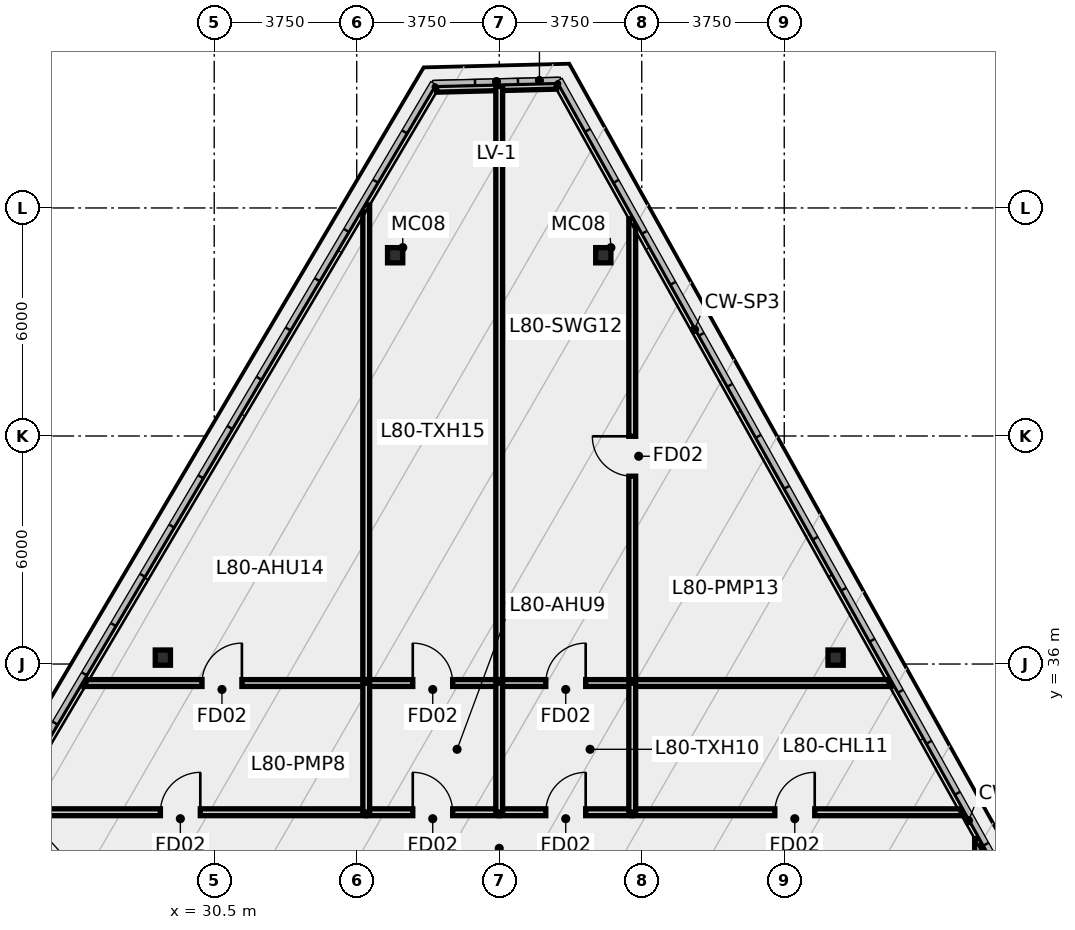
"""IFC4 building model, lengths in metres.
Left out: names, types, materials, properties, quantities, classifications, styles, units other than length and angle.
Written with IfcOpenShell. Run it as: python <this file> out.ifc"""

import sys

from ifc_helpers import new_model, si_unit, direction, frame, frame_2d, origin, origin_2d, place, context, subcontext, project, spatial, rectangle, hollow_rectangle, extrude, source, transform, mapped, element, fill, save


model = new_model("IFC4")
c1 = context("Model", 3, precision=1e-05, world=origin(), true_north=direction((0.0, 1.0)))
c2 = subcontext(c1, "Body", "Model", "MODEL_VIEW")
j1 = project(units=[si_unit("LENGTHUNIT", "METRE"), si_unit("PLANEANGLEUNIT", "RADIAN")], contexts=[c1])
p1 = place(None, origin())
s1 = spatial("IfcSite", under=j1, at=p1, CompositionType="ELEMENT")
p2 = place(p1, origin())
s2 = spatial("IfcBuilding", under=s1, at=p2, CompositionType="ELEMENT")
p3 = place(p2, frame((0.0, 0.0, 303.4)))
s3 = spatial("IfcBuildingStorey", under=s2, at=p3, CompositionType="ELEMENT", Elevation=303.4)
m1 = source(origin(), c2, "Body", "SweptSolid", [
    extrude(hollow_rectangle(XDim=0.4, YDim=0.4, WallThickness=0.016, at=origin_2d()), origin(), (0.0, 0.0, 1.0), 13.522),
])
p4 = place(p3, frame((40.739, 46.756, 0.0), z_axis=(0.0, 0.0, 1.0), x_axis=(1.0, 0.0, 0.0)))
e1 = element("IfcColumn", 1, at=p4, inside=s3, PredefinedType="COLUMN", context=c2, shape_type="MappedRepresentation", body=[
    mapped(m1, transform((0.0, 0.0, 0.0), scale=1.0)),
])
m2 = source(origin(), c2, "Body", "SweptSolid", [
    extrude(hollow_rectangle(XDim=0.4, YDim=0.4, WallThickness=0.016, at=origin_2d()), origin(), (0.0, 0.0, 1.0), 12.933),
])
p5 = place(p3, frame((35.261, 46.756, 0.0), z_axis=(0.0, 0.0, 1.0), x_axis=(1.0, 0.0, 0.0)))
e2 = element("IfcColumn", 2, at=p5, inside=s3, PredefinedType="COLUMN", context=c2, shape_type="MappedRepresentation", body=[
    mapped(m2, transform((0.0, 0.0, 0.0), scale=1.0)),
])
m3 = source(origin(), c2, "Body", "SweptSolid", [
    extrude(hollow_rectangle(XDim=0.4, YDim=0.4, WallThickness=0.016, at=origin_2d()), origin(), (0.0, 0.0, 1.0), 10.304),
])
p6 = place(p3, frame((29.148, 36.169, 0.0), z_axis=(0.0, 0.0, 1.0), x_axis=(1.0, 0.0, 0.0)))
e3 = element("IfcColumn", 3, at=p6, inside=s3, PredefinedType="COLUMN", context=c2, shape_type="MappedRepresentation", body=[
    mapped(m3, transform((0.0, 0.0, 0.0), scale=1.0)),
])
m4 = source(origin(), c2, "Body", "SweptSolid", [
    extrude(hollow_rectangle(XDim=0.4, YDim=0.4, WallThickness=0.016, at=origin_2d()), origin(), (0.0, 0.0, 1.0), 12.207),
])
p7 = place(p3, frame((46.852, 36.169, 0.0), z_axis=(0.0, 0.0, 1.0), x_axis=(1.0, 0.0, 0.0)))
e4 = element("IfcColumn", 4, at=p7, inside=s3, PredefinedType="COLUMN", context=c2, shape_type="MappedRepresentation", body=[
    mapped(m4, transform((0.0, 0.0, 0.0), scale=1.0)),
])
p8 = place(p3, frame((36.349, 51.177, 0.0), z_axis=(0.0, 0.0, 1.0), x_axis=(0.999684061487, 0.025135178708, 0.0)))
e5 = element("IfcWall", 5, at=p8, inside=s3, PredefinedType="STANDARD", context=c2, shape_type="SweptSolid", body=[
    extrude(rectangle(XDim=3.157, YDim=0.26, at=frame_2d((1.578, 0.0))), origin(), (0.0, 0.0, 1.0), 3.4),
])
p9 = place(p3, frame((38.0, 35.505, 0.0), z_axis=(0.0, 0.0, 1.0), x_axis=(0.0, 1.0, 0.0)))
e6 = element("IfcWall", 6, at=p9, inside=s3, PredefinedType="PARTITIONING", context=c2, shape_type="SweptSolid", body=[
    extrude(rectangle(XDim=15.693, YDim=0.18, at=frame_2d((7.847, 0.0))), origin(), (0.0, 0.0, 1.0), 3.15),
])
p10 = place(p3, frame((34.5, 35.505, 0.0), z_axis=(0.0, 0.0, 1.0), x_axis=(0.0, 1.0, 0.0)))
e7 = element("IfcWall", 7, at=p10, inside=s3, PredefinedType="PARTITIONING", context=c2, shape_type="SweptSolid", body=[
    extrude(rectangle(XDim=12.574, YDim=0.18, at=frame_2d((6.287, 0.0))), origin(), (0.0, 0.0, 1.0), 3.15),
])
p11 = place(p3, frame((41.5, 35.505, 0.0), z_axis=(0.0, 0.0, 1.0), x_axis=(0.0, 1.0, 0.0)))
e8 = element("IfcWall", 8, at=p11, inside=s3, PredefinedType="PARTITIONING", context=c2, shape_type="SweptSolid", body=[
    extrude(rectangle(XDim=12.21, YDim=0.18, at=frame_2d((6.105, 0.0))), origin(), (0.0, 0.0, 1.0), 3.15),
])
p12 = place(p11, frame((5.437, 0.0, 0.0)))
e9 = element("IfcOpeningElement", 9, at=p12, cuts=e8, PredefinedType="OPENING", context=c2, shape_type="SweptSolid", body=[
    extrude(rectangle(XDim=1.05, YDim=2.15, at=frame_2d((0.525, 1.075))), frame((0.0, 0.102, 0.0), z_axis=(0.0, -1.0, 0.0), x_axis=(1.0, 0.0, 0.0)), (0.0, 0.0, 1.0), 0.204),
])
p13 = place(p3, frame((25.062, 32.1, 0.0), z_axis=(0.0, 0.0, 1.0), x_axis=(1.0, 0.0, 0.0)))
e10 = element("IfcWall", 10, at=p13, inside=s3, PredefinedType="PARTITIONING", context=c2, shape_type="SweptSolid", body=[
    extrude(rectangle(XDim=9.433, YDim=0.18, at=frame_2d((4.717, 0.0))), origin(), (0.0, 0.0, 1.0), 3.15),
])
p14 = place(p13, frame((4.022, 0.0, 0.0)))
e11 = element("IfcOpeningElement", 11, at=p14, cuts=e10, PredefinedType="OPENING", context=c2, shape_type="SweptSolid", body=[
    extrude(rectangle(XDim=1.05, YDim=2.15, at=frame_2d((0.525, 1.075))), frame((0.0, 0.102, 0.0), z_axis=(0.0, -1.0, 0.0), x_axis=(1.0, 0.0, 0.0)), (0.0, 0.0, 1.0), 0.204),
])
p15 = place(p3, frame((41.505, 32.1, 0.0), z_axis=(0.0, 0.0, 1.0), x_axis=(1.0, 0.0, 0.0)))
e12 = element("IfcWall", 12, at=p15, inside=s3, PredefinedType="PARTITIONING", context=c2, shape_type="SweptSolid", body=[
    extrude(rectangle(XDim=8.699, YDim=0.18, at=frame_2d((4.35, 0.0))), origin(), (0.0, 0.0, 1.0), 3.15),
])
p16 = place(p15, frame((3.747, 0.0, 0.0)))
e13 = element("IfcOpeningElement", 13, at=p16, cuts=e12, PredefinedType="OPENING", context=c2, shape_type="SweptSolid", body=[
    extrude(rectangle(XDim=1.05, YDim=2.15, at=frame_2d((0.525, 1.075))), frame((0.0, 0.102, 0.0), z_axis=(0.0, -1.0, 0.0), x_axis=(1.0, 0.0, 0.0)), (0.0, 0.0, 1.0), 0.204),
])
p17 = place(p3, frame((27.072, 35.5, 0.0), z_axis=(0.0, 0.0, 1.0), x_axis=(1.0, 0.0, 0.0)))
e14 = element("IfcWall", 14, at=p17, inside=s3, PredefinedType="PARTITIONING", context=c2, shape_type="SweptSolid", body=[
    extrude(rectangle(XDim=7.423, YDim=0.18, at=frame_2d((3.712, 0.0))), origin(), (0.0, 0.0, 1.0), 3.15),
])
p18 = place(p17, frame((3.107, 0.0, 0.0)))
e15 = element("IfcOpeningElement", 15, at=p18, cuts=e14, PredefinedType="OPENING", context=c2, shape_type="SweptSolid", body=[
    extrude(rectangle(XDim=1.05, YDim=2.15, at=frame_2d((0.525, 1.075))), frame((0.0, 0.102, 0.0), z_axis=(0.0, -1.0, 0.0), x_axis=(1.0, 0.0, 0.0)), (0.0, 0.0, 1.0), 0.204),
])
p19 = place(p3, frame((41.505, 35.5, 0.0), z_axis=(0.0, 0.0, 1.0), x_axis=(1.0, 0.0, 0.0)))
e16 = element("IfcWall", 16, at=p19, inside=s3, PredefinedType="PARTITIONING", context=c2, shape_type="SweptSolid", body=[
    extrude(rectangle(XDim=6.802, YDim=0.18, at=frame_2d((3.401, 0.0))), origin(), (0.0, 0.0, 1.0), 3.15),
])
p20 = place(p3, frame((50.6, 25.005, 0.0), z_axis=(0.0, 0.0, 1.0), x_axis=(0.0, 1.0, 0.0)))
e17 = element("IfcWall", 17, at=p20, inside=s3, PredefinedType="PARTITIONING", context=c2, shape_type="SweptSolid", body=[
    extrude(rectangle(XDim=6.402, YDim=0.18, at=frame_2d((3.201, 0.0))), origin(), (0.0, 0.0, 1.0), 3.15),
])
p21 = place(p20, frame((2.88, 0.0, 0.0)))
e18 = element("IfcOpeningElement", 18, at=p21, cuts=e17, PredefinedType="OPENING", context=c2, shape_type="SweptSolid", body=[
    extrude(rectangle(XDim=1.05, YDim=2.15, at=frame_2d((0.525, 1.075))), frame((0.0, 0.102, 0.0), z_axis=(0.0, -1.0, 0.0), x_axis=(1.0, 0.0, 0.0)), (0.0, 0.0, 1.0), 0.204),
])
p22 = place(p3, frame((34.505, 32.1, 0.0), z_axis=(0.0, 0.0, 1.0), x_axis=(1.0, 0.0, 0.0)))
e19 = element("IfcWall", 19, at=p22, inside=s3, PredefinedType="PARTITIONING", context=c2, shape_type="SweptSolid", body=[
    extrude(rectangle(XDim=3.49, YDim=0.18, at=frame_2d((1.745, 0.0))), origin(), (0.0, 0.0, 1.0), 3.15),
])
p23 = place(p22, frame((1.22, 0.0, 0.0)))
e20 = element("IfcOpeningElement", 20, at=p23, cuts=e19, PredefinedType="OPENING", context=c2, shape_type="SweptSolid", body=[
    extrude(rectangle(XDim=1.05, YDim=2.15, at=frame_2d((0.525, 1.075))), frame((0.0, 0.102, 0.0), z_axis=(0.0, -1.0, 0.0), x_axis=(1.0, 0.0, 0.0)), (0.0, 0.0, 1.0), 0.204),
])
p24 = place(p3, frame((38.005, 32.1, 0.0), z_axis=(0.0, 0.0, 1.0), x_axis=(1.0, 0.0, 0.0)))
e21 = element("IfcWall", 21, at=p24, inside=s3, PredefinedType="PARTITIONING", context=c2, shape_type="SweptSolid", body=[
    extrude(rectangle(XDim=3.49, YDim=0.18, at=frame_2d((1.745, 0.0))), origin(), (0.0, 0.0, 1.0), 3.15),
])
p25 = place(p24, frame((1.22, 0.0, 0.0)))
e22 = element("IfcOpeningElement", 22, at=p25, cuts=e21, PredefinedType="OPENING", context=c2, shape_type="SweptSolid", body=[
    extrude(rectangle(XDim=1.05, YDim=2.15, at=frame_2d((0.525, 1.075))), frame((0.0, 0.102, 0.0), z_axis=(0.0, -1.0, 0.0), x_axis=(1.0, 0.0, 0.0)), (0.0, 0.0, 1.0), 0.204),
])
p26 = place(p3, frame((34.505, 35.5, 0.0), z_axis=(0.0, 0.0, 1.0), x_axis=(1.0, 0.0, 0.0)))
e23 = element("IfcWall", 23, at=p26, inside=s3, PredefinedType="PARTITIONING", context=c2, shape_type="SweptSolid", body=[
    extrude(rectangle(XDim=3.49, YDim=0.18, at=frame_2d((1.745, 0.0))), origin(), (0.0, 0.0, 1.0), 3.15),
])
p27 = place(p26, frame((1.22, 0.0, 0.0)))
e24 = element("IfcOpeningElement", 24, at=p27, cuts=e23, PredefinedType="OPENING", context=c2, shape_type="SweptSolid", body=[
    extrude(rectangle(XDim=1.05, YDim=2.15, at=frame_2d((0.525, 1.075))), frame((0.0, 0.102, 0.0), z_axis=(0.0, -1.0, 0.0), x_axis=(1.0, 0.0, 0.0)), (0.0, 0.0, 1.0), 0.204),
])
p28 = place(p3, frame((38.005, 35.5, 0.0), z_axis=(0.0, 0.0, 1.0), x_axis=(1.0, 0.0, 0.0)))
e25 = element("IfcWall", 25, at=p28, inside=s3, PredefinedType="PARTITIONING", context=c2, shape_type="SweptSolid", body=[
    extrude(rectangle(XDim=3.49, YDim=0.18, at=frame_2d((1.745, 0.0))), origin(), (0.0, 0.0, 1.0), 3.15),
])
p29 = place(p28, frame((1.22, 0.0, 0.0)))
e26 = element("IfcOpeningElement", 26, at=p29, cuts=e25, PredefinedType="OPENING", context=c2, shape_type="SweptSolid", body=[
    extrude(rectangle(XDim=1.05, YDim=2.15, at=frame_2d((0.525, 1.075))), frame((0.0, 0.102, 0.0), z_axis=(0.0, -1.0, 0.0), x_axis=(1.0, 0.0, 0.0)), (0.0, 0.0, 1.0), 0.204),
])
for number, where, z_axis, x_axis in (
    (27, (34.5, 32.105, 0.0), (0.0, 0.0, 1.0), (0.0, 1.0, 0.0)),
    (28, (38.0, 32.105, 0.0), (0.0, 0.0, 1.0), (0.0, 1.0, 0.0)),
    (29, (41.5, 32.105, 0.0), (0.0, 0.0, 1.0), (0.0, 1.0, 0.0)),
):
    element("IfcWall", number, at=place(p3, frame(where, z_axis=z_axis, x_axis=x_axis)), inside=s3, PredefinedType="PARTITIONING", context=c2, shape_type="SweptSolid", body=[
        extrude(rectangle(XDim=3.39, YDim=0.18, at=frame_2d((1.695, 0.0))), origin(), (0.0, 0.0, 1.0), 3.15),
    ])
p30 = place(p12, origin())
e30 = element("IfcDoor", 30, at=p30, inside=s3, OperationType="SINGLE_SWING_RIGHT", PredefinedType="DOOR", context=c2, shape_type="SweptSolid", body=[
    extrude(rectangle(XDim=1.05, YDim=2.15, at=frame_2d((0.525, 1.075))), frame((0.0, 0.025, 0.0), z_axis=(0.0, -1.0, 0.0), x_axis=(1.0, 0.0, 0.0)), (0.0, 0.0, 1.0), 0.05),
])
fill(e9, e30)
p31 = place(p14, origin())
e31 = element("IfcDoor", 31, at=p31, inside=s3, OperationType="SINGLE_SWING_RIGHT", PredefinedType="DOOR", context=c2, shape_type="SweptSolid", body=[
    extrude(rectangle(XDim=1.05, YDim=2.15, at=frame_2d((0.525, 1.075))), frame((0.0, 0.025, 0.0), z_axis=(0.0, -1.0, 0.0), x_axis=(1.0, 0.0, 0.0)), (0.0, 0.0, 1.0), 0.05),
])
fill(e11, e31)
p32 = place(p16, origin())
e32 = element("IfcDoor", 32, at=p32, inside=s3, OperationType="SINGLE_SWING_RIGHT", PredefinedType="DOOR", context=c2, shape_type="SweptSolid", body=[
    extrude(rectangle(XDim=1.05, YDim=2.15, at=frame_2d((0.525, 1.075))), frame((0.0, 0.025, 0.0), z_axis=(0.0, -1.0, 0.0), x_axis=(1.0, 0.0, 0.0)), (0.0, 0.0, 1.0), 0.05),
])
fill(e13, e32)
p33 = place(p18, origin())
e33 = element("IfcDoor", 33, at=p33, inside=s3, OperationType="SINGLE_SWING_RIGHT", PredefinedType="DOOR", context=c2, shape_type="SweptSolid", body=[
    extrude(rectangle(XDim=1.05, YDim=2.15, at=frame_2d((0.525, 1.075))), frame((0.0, 0.025, 0.0), z_axis=(0.0, -1.0, 0.0), x_axis=(1.0, 0.0, 0.0)), (0.0, 0.0, 1.0), 0.05),
])
fill(e15, e33)
p34 = place(p23, origin())
e34 = element("IfcDoor", 34, at=p34, inside=s3, OperationType="SINGLE_SWING_LEFT", PredefinedType="DOOR", context=c2, shape_type="SweptSolid", body=[
    extrude(rectangle(XDim=1.05, YDim=2.15, at=frame_2d((0.525, 1.075))), frame((0.0, 0.025, 0.0), z_axis=(0.0, -1.0, 0.0), x_axis=(1.0, 0.0, 0.0)), (0.0, 0.0, 1.0), 0.05),
])
fill(e20, e34)
p35 = place(p25, origin())
e35 = element("IfcDoor", 35, at=p35, inside=s3, OperationType="SINGLE_SWING_RIGHT", PredefinedType="DOOR", context=c2, shape_type="SweptSolid", body=[
    extrude(rectangle(XDim=1.05, YDim=2.15, at=frame_2d((0.525, 1.075))), frame((0.0, 0.025, 0.0), z_axis=(0.0, -1.0, 0.0), x_axis=(1.0, 0.0, 0.0)), (0.0, 0.0, 1.0), 0.05),
])
fill(e22, e35)
p36 = place(p27, origin())
e36 = element("IfcDoor", 36, at=p36, inside=s3, OperationType="SINGLE_SWING_LEFT", PredefinedType="DOOR", context=c2, shape_type="SweptSolid", body=[
    extrude(rectangle(XDim=1.05, YDim=2.15, at=frame_2d((0.525, 1.075))), frame((0.0, 0.025, 0.0), z_axis=(0.0, -1.0, 0.0), x_axis=(1.0, 0.0, 0.0)), (0.0, 0.0, 1.0), 0.05),
])
fill(e24, e36)
p37 = place(p29, origin())
e37 = element("IfcDoor", 37, at=p37, inside=s3, OperationType="SINGLE_SWING_RIGHT", PredefinedType="DOOR", context=c2, shape_type="SweptSolid", body=[
    extrude(rectangle(XDim=1.05, YDim=2.15, at=frame_2d((0.525, 1.075))), frame((0.0, 0.025, 0.0), z_axis=(0.0, -1.0, 0.0), x_axis=(1.0, 0.0, 0.0)), (0.0, 0.0, 1.0), 0.05),
])
fill(e26, e37)
save(model, sys.argv[1])
